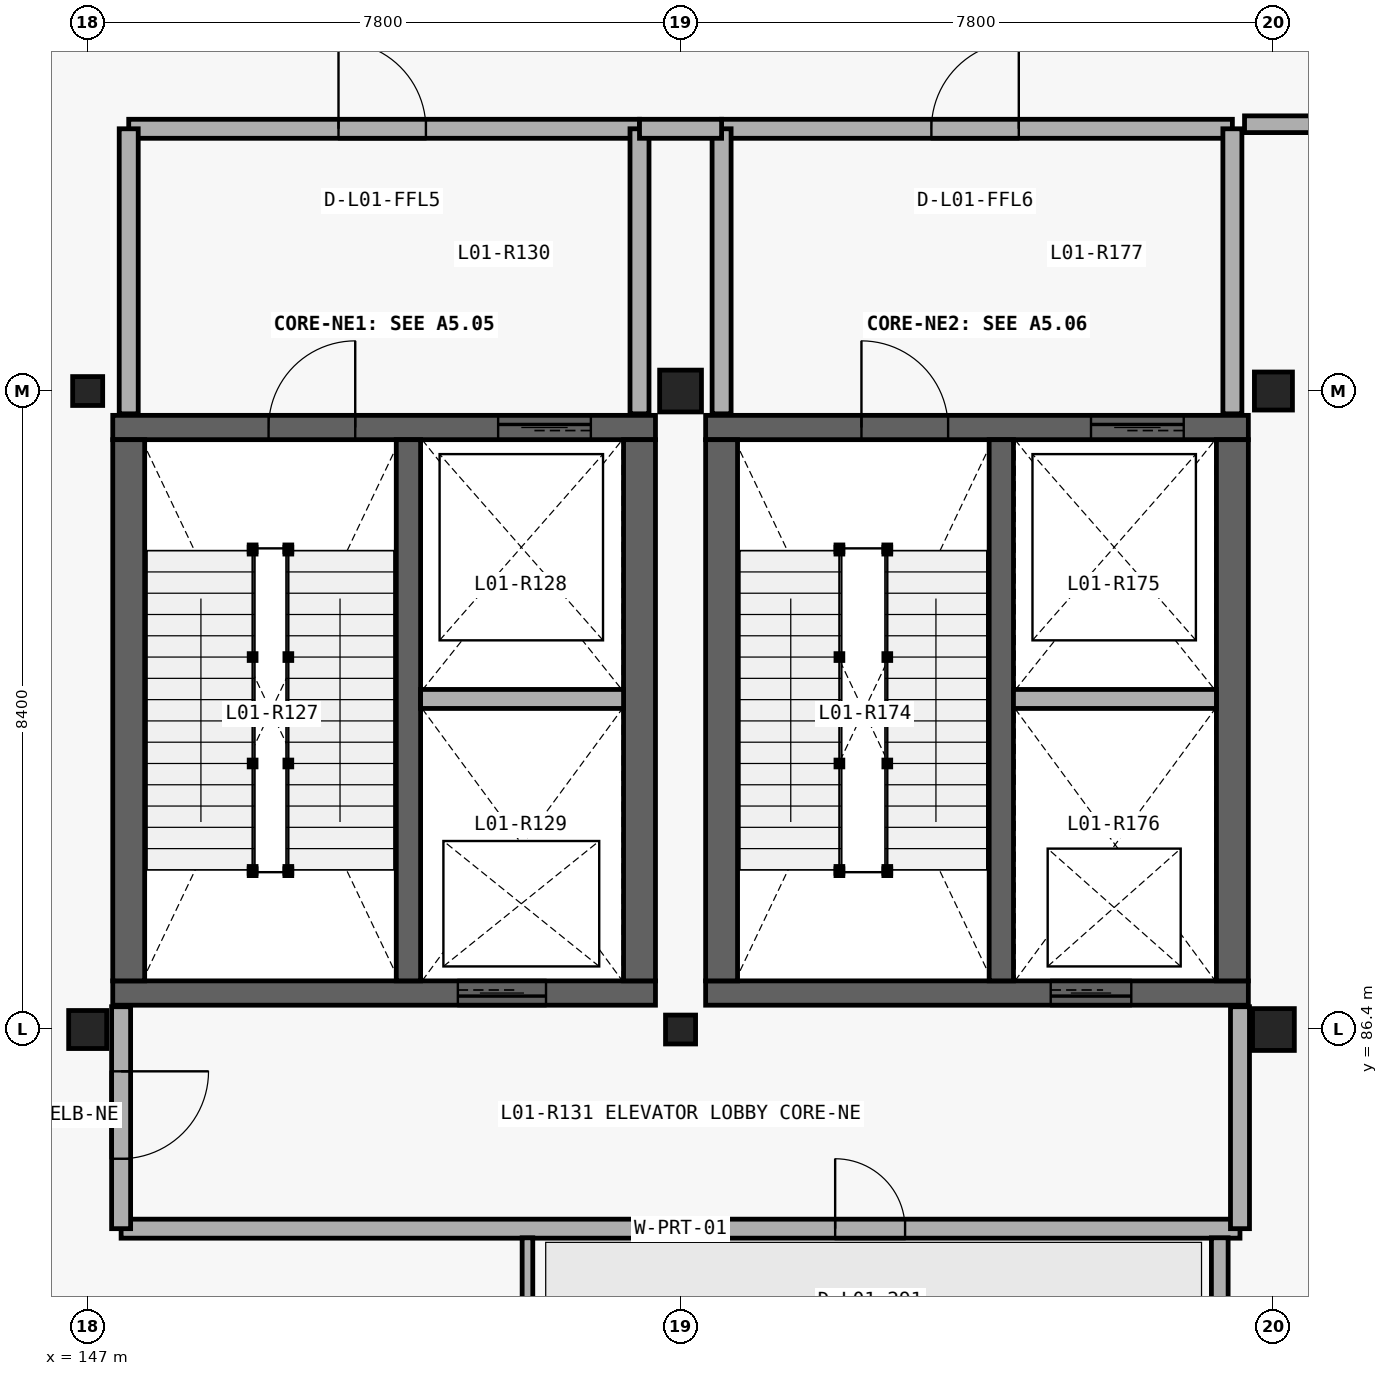
"""IFC4 building model, lengths in metres.
Left out: names, types, materials, properties, quantities, classifications, styles, units other than length and angle.
Written with IfcOpenShell. Run it as: python <this file> out.ifc"""

import sys

from ifc_helpers import new_model, si_unit, direction, frame, frame_2d, origin_with_axes, origin_2d_with_axis, place, context, subcontext, project, spatial, rectangle, i_section, extrude, element, fill, save


model = new_model("IFC4")
c1 = context("Model", 3, precision=1e-05, world=origin_with_axes(), true_north=direction((0.0, 1.0)))
c2 = subcontext(c1, "Body", "Model", "MODEL_VIEW")
j1 = project(units=[si_unit("LENGTHUNIT", "METRE"), si_unit("PLANEANGLEUNIT", "RADIAN")], contexts=[c1])
p1 = place(None, origin_with_axes())
s1 = spatial("IfcSite", under=j1, at=p1, CompositionType="ELEMENT")
p2 = place(p1, origin_with_axes())
s2 = spatial("IfcBuilding", under=s1, at=p2, CompositionType="ELEMENT")
p3 = place(p2, frame((0.0, 0.0, 5.4), z_axis=(0.0, 0.0, 1.0), x_axis=(1.0, 0.0, 0.0)))
s3 = spatial("IfcBuildingStorey", under=s2, at=p3, CompositionType="ELEMENT", Elevation=5.4)
p4 = place(None, frame((147.33, 86.88, 5.4), z_axis=(0.0, 0.0, 1.0), x_axis=(1.0, 0.0, 0.0)))
e1 = element("IfcWall", 1, at=p4, inside=s3, PredefinedType="SHEAR", context=c2, shape_type="SweptSolid", body=[
    extrude(rectangle(XDim=7.14, YDim=0.32, at=frame_2d((3.57, 0.0), x_axis=(1.0, 0.0))), origin_with_axes(), (0.0, 0.0, 1.0), 5.4),
])
p5 = place(None, frame((152.45, 86.88, 5.4), z_axis=(0.0, 0.0, 1.0), x_axis=(1.0, 0.0, 0.0)))
e2 = element("IfcOpeningElement", 2, at=p5, cuts=e1, PredefinedType="OPENING", context=c2, shape_type="SweptSolid", body=[
    extrude(rectangle(XDim=1.16, YDim=2.2, at=frame_2d((0.0, 1.1), x_axis=(1.0, 0.0))), frame((0.0, 0.17, 0.0), z_axis=(0.0, -1.0, 0.0), x_axis=(1.0, 0.0, 0.0)), (0.0, 0.0, 1.0), 0.34),
])
p6 = place(None, frame((154.47, 94.32, 5.4), z_axis=(0.0, 0.0, 1.0), x_axis=(-1.0, 0.0, 0.0)))
e3 = element("IfcWall", 3, at=p6, inside=s3, PredefinedType="SHEAR", context=c2, shape_type="SweptSolid", body=[
    extrude(rectangle(XDim=7.14, YDim=0.32, at=frame_2d((3.57, 0.0), x_axis=(1.0, 0.0))), origin_with_axes(), (0.0, 0.0, 1.0), 5.4),
])
p7 = place(None, frame((149.95, 94.32, 5.4), z_axis=(0.0, 0.0, 1.0), x_axis=(-1.0, 0.0, 0.0)))
e4 = element("IfcOpeningElement", 4, at=p7, cuts=e3, PredefinedType="OPENING", context=c2, shape_type="SweptSolid", body=[
    extrude(rectangle(XDim=1.14, YDim=2.18, at=frame_2d((0.0, 1.09), x_axis=(1.0, 0.0))), frame((0.0, 0.17, 0.0), z_axis=(0.0, -1.0, 0.0), x_axis=(1.0, 0.0, 0.0)), (0.0, 0.0, 1.0), 0.34),
])
p8 = place(None, frame((153.01, 94.32, 5.4), z_axis=(0.0, 0.0, 1.0), x_axis=(-1.0, 0.0, 0.0)))
e5 = element("IfcOpeningElement", 5, at=p8, cuts=e3, PredefinedType="OPENING", context=c2, shape_type="SweptSolid", body=[
    extrude(rectangle(XDim=1.22, YDim=2.28, at=frame_2d((0.0, 1.14), x_axis=(1.0, 0.0))), frame((0.0, 0.17, 0.0), z_axis=(0.0, -1.0, 0.0), x_axis=(1.0, 0.0, 0.0)), (0.0, 0.0, 1.0), 0.34),
])
for number, where, z_axis, x_axis in (
    (6, (154.26, 87.04, 5.4), (0.0, 0.0, 1.0), (0.0, 1.0, 0.0)),
    (7, (147.54, 94.16, 5.4), (0.0, 0.0, 1.0), (0.0, -1.0, 0.0)),
):
    element("IfcWall", number, at=place(None, frame(where, z_axis=z_axis, x_axis=x_axis)), inside=s3, PredefinedType="SHEAR", context=c2, shape_type="SweptSolid", body=[
        extrude(rectangle(XDim=7.12, YDim=0.42, at=frame_2d((3.56, 0.0), x_axis=(1.0, 0.0))), origin_with_axes(), (0.0, 0.0, 1.0), 5.4),
    ])
p9 = place(None, frame((151.22, 87.04, 5.4), z_axis=(0.0, 0.0, 1.0), x_axis=(0.0, 1.0, 0.0)))
e8 = element("IfcWall", 8, at=p9, inside=s3, PredefinedType="SHEAR", context=c2, shape_type="SweptSolid", body=[
    extrude(rectangle(XDim=7.12, YDim=0.32, at=frame_2d((3.56, 0.0), x_axis=(1.0, 0.0))), origin_with_axes(), (0.0, 0.0, 1.0), 5.4),
])
p10 = place(None, frame((151.38, 90.749, 5.4), z_axis=(0.0, 0.0, 1.0), x_axis=(1.0, 0.0, 0.0)))
e9 = element("IfcWall", 9, at=p10, inside=s3, PredefinedType="PARTITIONING", context=c2, shape_type="SweptSolid", body=[
    extrude(rectangle(XDim=2.67, YDim=0.25, at=frame_2d((1.335, 0.0), x_axis=(1.0, 0.0))), origin_with_axes(), (0.0, 0.0, 1.0), 5.08),
])
p11 = place(None, frame((154.26, 98.25, 5.4), z_axis=(0.0, 0.0, 1.0), x_axis=(-1.0, 0.0, 0.0)))
e10 = element("IfcWall", 10, at=p11, inside=s3, PredefinedType="PARTITIONING", context=c2, shape_type="SweptSolid", body=[
    extrude(rectangle(XDim=6.72, YDim=0.25, at=frame_2d((3.36, 0.0), x_axis=(1.0, 0.0))), origin_with_axes(), (0.0, 0.0, 1.0), 5.08),
])
p12 = place(None, frame((150.875, 98.25, 5.4), z_axis=(0.0, 0.0, 1.0), x_axis=(-1.0, 0.0, 0.0)))
e11 = element("IfcOpeningElement", 11, at=p12, cuts=e10, PredefinedType="OPENING", context=c2, shape_type="SweptSolid", body=[
    extrude(rectangle(XDim=1.15, YDim=2.25, at=frame_2d((0.0, 1.125), x_axis=(1.0, 0.0))), frame((0.0, 0.135, 0.0), z_axis=(0.0, -1.0, 0.0), x_axis=(1.0, 0.0, 0.0)), (0.0, 0.0, 1.0), 0.27),
])
for number, where, z_axis, x_axis in (
    (12, (147.54, 94.5, 5.4), (0.0, 0.0, 1.0), (0.0, 1.0, 0.0)),
    (13, (154.26, 94.5, 5.4), (0.0, 0.0, 1.0), (0.0, 1.0, 0.0)),
):
    element("IfcWall", number, at=place(None, frame(where, z_axis=z_axis, x_axis=x_axis)), inside=s3, PredefinedType="PARTITIONING", context=c2, shape_type="SweptSolid", body=[
        extrude(rectangle(XDim=3.75, YDim=0.25, at=frame_2d((1.875, 0.0), x_axis=(1.0, 0.0))), origin_with_axes(), (0.0, 0.0, 1.0), 5.08),
    ])
p13 = place(None, frame((147.44, 83.78, 5.4), z_axis=(0.0, 0.0, 1.0), x_axis=(1.0, 0.0, 0.0)))
e14 = element("IfcWall", 14, at=p13, inside=s3, PredefinedType="PARTITIONING", context=c2, shape_type="SweptSolid", body=[
    extrude(rectangle(XDim=14.72, YDim=0.25, at=frame_2d((7.36, 0.0), x_axis=(1.0, 0.0))), origin_with_axes(), (0.0, 0.0, 1.0), 4.61),
])
p14 = place(None, frame((157.294, 83.78, 5.4), z_axis=(0.0, 0.0, 1.0), x_axis=(1.0, 0.0, 0.0)))
e15 = element("IfcOpeningElement", 15, at=p14, cuts=e14, PredefinedType="OPENING", context=c2, shape_type="SweptSolid", body=[
    extrude(rectangle(XDim=0.92, YDim=2.14, at=frame_2d((0.0, 1.07), x_axis=(1.0, 0.0))), frame((0.0, 0.135, 0.0), z_axis=(0.0, -1.0, 0.0), x_axis=(1.0, 0.0, 0.0)), (0.0, 0.0, 1.0), 0.27),
])
p15 = place(None, frame((162.16, 83.78, 5.4), z_axis=(0.0, 0.0, 1.0), x_axis=(0.0, 1.0, 0.0)))
e16 = element("IfcWall", 16, at=p15, inside=s3, PredefinedType="PARTITIONING", context=c2, shape_type="SweptSolid", body=[
    extrude(rectangle(XDim=2.92, YDim=0.25, at=frame_2d((1.46, 0.0), x_axis=(1.0, 0.0))), origin_with_axes(), (0.0, 0.0, 1.0), 5.08),
])
p16 = place(None, frame((147.44, 86.7, 5.4), z_axis=(0.0, 0.0, 1.0), x_axis=(0.0, -1.0, 0.0)))
e17 = element("IfcWall", 17, at=p16, inside=s3, PredefinedType="PARTITIONING", context=c2, shape_type="SweptSolid", body=[
    extrude(rectangle(XDim=2.92, YDim=0.25, at=frame_2d((1.46, 0.0), x_axis=(1.0, 0.0))), origin_with_axes(), (0.0, 0.0, 1.0), 5.08),
])
p17 = place(None, frame((147.44, 85.275, 5.4), z_axis=(0.0, 0.0, 1.0), x_axis=(0.0, -1.0, 0.0)))
e18 = element("IfcOpeningElement", 18, at=p17, cuts=e17, PredefinedType="OPENING", context=c2, shape_type="SweptSolid", body=[
    extrude(rectangle(XDim=1.15, YDim=2.25, at=frame_2d((0.0, 1.125), x_axis=(1.0, 0.0))), frame((0.0, 0.135, 0.0), z_axis=(0.0, -1.0, 0.0), x_axis=(1.0, 0.0, 0.0)), (0.0, 0.0, 1.0), 0.27),
])
p18 = place(None, frame((155.13, 86.88, 5.4), z_axis=(0.0, 0.0, 1.0), x_axis=(1.0, 0.0, 0.0)))
e19 = element("IfcWall", 19, at=p18, inside=s3, PredefinedType="SHEAR", context=c2, shape_type="SweptSolid", body=[
    extrude(rectangle(XDim=7.14, YDim=0.32, at=frame_2d((3.57, 0.0), x_axis=(1.0, 0.0))), origin_with_axes(), (0.0, 0.0, 1.0), 5.4),
])
p19 = place(None, frame((160.2, 86.88, 5.4), z_axis=(0.0, 0.0, 1.0), x_axis=(1.0, 0.0, 0.0)))
e20 = element("IfcOpeningElement", 20, at=p19, cuts=e19, PredefinedType="OPENING", context=c2, shape_type="SweptSolid", body=[
    extrude(rectangle(XDim=1.06, YDim=2.16, at=frame_2d((0.0, 1.08), x_axis=(1.0, 0.0))), frame((0.0, 0.17, 0.0), z_axis=(0.0, -1.0, 0.0), x_axis=(1.0, 0.0, 0.0)), (0.0, 0.0, 1.0), 0.34),
])
p20 = place(None, frame((162.27, 94.32, 5.4), z_axis=(0.0, 0.0, 1.0), x_axis=(-1.0, 0.0, 0.0)))
e21 = element("IfcWall", 21, at=p20, inside=s3, PredefinedType="SHEAR", context=c2, shape_type="SweptSolid", body=[
    extrude(rectangle(XDim=7.14, YDim=0.32, at=frame_2d((3.57, 0.0), x_axis=(1.0, 0.0))), origin_with_axes(), (0.0, 0.0, 1.0), 5.4),
])
p21 = place(None, frame((157.75, 94.32, 5.4), z_axis=(0.0, 0.0, 1.0), x_axis=(-1.0, 0.0, 0.0)))
e22 = element("IfcOpeningElement", 22, at=p21, cuts=e21, PredefinedType="OPENING", context=c2, shape_type="SweptSolid", body=[
    extrude(rectangle(XDim=1.14, YDim=2.18, at=frame_2d((0.0, 1.09), x_axis=(1.0, 0.0))), frame((0.0, 0.17, 0.0), z_axis=(0.0, -1.0, 0.0), x_axis=(1.0, 0.0, 0.0)), (0.0, 0.0, 1.0), 0.34),
])
p22 = place(None, frame((160.81, 94.32, 5.4), z_axis=(0.0, 0.0, 1.0), x_axis=(-1.0, 0.0, 0.0)))
e23 = element("IfcOpeningElement", 23, at=p22, cuts=e21, PredefinedType="OPENING", context=c2, shape_type="SweptSolid", body=[
    extrude(rectangle(XDim=1.22, YDim=2.28, at=frame_2d((0.0, 1.14), x_axis=(1.0, 0.0))), frame((0.0, 0.17, 0.0), z_axis=(0.0, -1.0, 0.0), x_axis=(1.0, 0.0, 0.0)), (0.0, 0.0, 1.0), 0.34),
])
for number, where, z_axis, x_axis in (
    (24, (162.06, 87.04, 5.4), (0.0, 0.0, 1.0), (0.0, 1.0, 0.0)),
    (25, (155.34, 94.16, 5.4), (0.0, 0.0, 1.0), (0.0, -1.0, 0.0)),
):
    element("IfcWall", number, at=place(None, frame(where, z_axis=z_axis, x_axis=x_axis)), inside=s3, PredefinedType="SHEAR", context=c2, shape_type="SweptSolid", body=[
        extrude(rectangle(XDim=7.12, YDim=0.42, at=frame_2d((3.56, 0.0), x_axis=(1.0, 0.0))), origin_with_axes(), (0.0, 0.0, 1.0), 5.4),
    ])
p23 = place(None, frame((159.02, 87.04, 5.4), z_axis=(0.0, 0.0, 1.0), x_axis=(0.0, 1.0, 0.0)))
e26 = element("IfcWall", 26, at=p23, inside=s3, PredefinedType="SHEAR", context=c2, shape_type="SweptSolid", body=[
    extrude(rectangle(XDim=7.12, YDim=0.32, at=frame_2d((3.56, 0.0), x_axis=(1.0, 0.0))), origin_with_axes(), (0.0, 0.0, 1.0), 5.4),
])
p24 = place(None, frame((159.18, 90.749, 5.4), z_axis=(0.0, 0.0, 1.0), x_axis=(1.0, 0.0, 0.0)))
e27 = element("IfcWall", 27, at=p24, inside=s3, PredefinedType="PARTITIONING", context=c2, shape_type="SweptSolid", body=[
    extrude(rectangle(XDim=2.67, YDim=0.25, at=frame_2d((1.335, 0.0), x_axis=(1.0, 0.0))), origin_with_axes(), (0.0, 0.0, 1.0), 5.08),
])
p25 = place(None, frame((162.06, 98.25, 5.4), z_axis=(0.0, 0.0, 1.0), x_axis=(-1.0, 0.0, 0.0)))
e28 = element("IfcWall", 28, at=p25, inside=s3, PredefinedType="PARTITIONING", context=c2, shape_type="SweptSolid", body=[
    extrude(rectangle(XDim=6.72, YDim=0.25, at=frame_2d((3.36, 0.0), x_axis=(1.0, 0.0))), origin_with_axes(), (0.0, 0.0, 1.0), 5.08),
])
p26 = place(None, frame((158.675, 98.25, 5.4), z_axis=(0.0, 0.0, 1.0), x_axis=(-1.0, 0.0, 0.0)))
e29 = element("IfcOpeningElement", 29, at=p26, cuts=e28, PredefinedType="OPENING", context=c2, shape_type="SweptSolid", body=[
    extrude(rectangle(XDim=1.15, YDim=2.25, at=frame_2d((0.0, 1.125), x_axis=(1.0, 0.0))), frame((0.0, 0.135, 0.0), z_axis=(0.0, -1.0, 0.0), x_axis=(1.0, 0.0, 0.0)), (0.0, 0.0, 1.0), 0.27),
])
for number, where, z_axis, x_axis in (
    (30, (155.34, 94.5, 5.4), (0.0, 0.0, 1.0), (0.0, 1.0, 0.0)),
    (31, (162.06, 94.5, 5.4), (0.0, 0.0, 1.0), (0.0, 1.0, 0.0)),
):
    element("IfcWall", number, at=place(None, frame(where, z_axis=z_axis, x_axis=x_axis)), inside=s3, PredefinedType="PARTITIONING", context=c2, shape_type="SweptSolid", body=[
        extrude(rectangle(XDim=3.75, YDim=0.25, at=frame_2d((1.875, 0.0), x_axis=(1.0, 0.0))), origin_with_axes(), (0.0, 0.0, 1.0), 5.08),
    ])
p27 = place(None, frame((154.26, 98.25, 5.4), z_axis=(0.0, 0.0, 1.0), x_axis=(1.0, 0.0, 0.0)))
e32 = element("IfcWall", 32, at=p27, inside=s3, PredefinedType="PARTITIONING", context=c2, shape_type="SweptSolid", body=[
    extrude(rectangle(XDim=1.08, YDim=0.25, at=frame_2d((0.54, 0.0), x_axis=(1.0, 0.0))), origin_with_axes(), (0.0, 0.0, 1.0), 5.08),
])
p28 = place(None, frame((162.22, 98.31, 5.4), z_axis=(0.0, 0.0, 1.0), x_axis=(1.0, 0.0, 0.0)))
e33 = element("IfcWall", 33, at=p28, inside=s3, PredefinedType="PARTITIONING", context=c2, shape_type="SweptSolid", body=[
    extrude(rectangle(XDim=7.04, YDim=0.22, at=frame_2d((3.52, 0.0), x_axis=(1.0, 0.0))), origin_with_axes(), (0.0, 0.0, 1.0), 5.08),
])
p29 = place(None, frame((165.74, 98.31, 5.4), z_axis=(0.0, 0.0, 1.0), x_axis=(1.0, 0.0, 0.0)))
e34 = element("IfcOpeningElement", 34, at=p29, cuts=e33, PredefinedType="OPENING", context=c2, shape_type="SweptSolid", body=[
    extrude(rectangle(XDim=0.95, YDim=2.16, at=frame_2d((0.0, 1.08), x_axis=(1.0, 0.0))), frame((0.0, 0.12, 0.0), z_axis=(0.0, -1.0, 0.0), x_axis=(1.0, 0.0, 0.0)), (0.0, 0.0, 1.0), 0.24),
])
p30 = place(None, frame((152.786, 69.74, 5.4), z_axis=(0.0, 0.0, 1.0), x_axis=(0.0, 1.0, 0.0)))
e35 = element("IfcWall", 35, at=p30, inside=s3, PredefinedType="PARTITIONING", context=c2, shape_type="SweptSolid", body=[
    extrude(rectangle(XDim=13.92, YDim=0.14, at=frame_2d((6.96, 0.0), x_axis=(1.0, 0.0))), origin_with_axes(), (0.0, 0.0, 1.0), 5.08),
])
p31 = place(None, frame((161.894, 69.74, 5.4), z_axis=(0.0, 0.0, 1.0), x_axis=(0.0, 1.0, 0.0)))
e36 = element("IfcWall", 36, at=p31, inside=s3, PredefinedType="PARTITIONING", context=c2, shape_type="SweptSolid", body=[
    extrude(rectangle(XDim=13.92, YDim=0.22, at=frame_2d((6.96, 0.0), x_axis=(1.0, 0.0))), origin_with_axes(), (0.0, 0.0, 1.0), 5.08),
])
p32 = place(None, frame((147.0, 86.4, 5.4), z_axis=(0.0, 0.0, 1.0), x_axis=(1.0, 0.0, 0.0)))
e37 = element("IfcColumn", 37, at=p32, inside=s3, PredefinedType="COLUMN", context=c2, shape_type="SweptSolid", body=[
    extrude(i_section(OverallWidth=0.5, OverallDepth=0.5, WebThickness=0.022, FlangeThickness=0.036, at=origin_2d_with_axis()), origin_with_axes(), (0.0, 0.0, 1.0), 5.4),
])
for number, where, z_axis, x_axis in (
    (38, (147.0, 94.8, 5.4), (0.0, 0.0, 1.0), (1.0, 0.0, 0.0)),
    (39, (154.8, 86.4, 5.4), (0.0, 0.0, 1.0), (1.0, 0.0, 0.0)),
):
    element("IfcColumn", number, at=place(None, frame(where, z_axis=z_axis, x_axis=x_axis)), inside=s3, PredefinedType="COLUMN", context=c2, shape_type="SweptSolid", body=[
        extrude(i_section(OverallWidth=0.395, OverallDepth=0.38, WebThickness=0.019, FlangeThickness=0.03, at=origin_2d_with_axis()), origin_with_axes(), (0.0, 0.0, 1.0), 5.4),
    ])
for number, where, z_axis, x_axis in (
    (40, (154.8, 94.8, 5.4), (0.0, 0.0, 1.0), (1.0, 0.0, 0.0)),
    (41, (162.6, 86.4, 5.4), (0.0, 0.0, 1.0), (1.0, 0.0, 0.0)),
):
    element("IfcColumn", number, at=place(None, frame(where, z_axis=z_axis, x_axis=x_axis)), inside=s3, PredefinedType="COLUMN", context=c2, shape_type="SweptSolid", body=[
        extrude(i_section(OverallWidth=0.55, OverallDepth=0.55, WebThickness=0.025, FlangeThickness=0.042, at=origin_2d_with_axis()), origin_with_axes(), (0.0, 0.0, 1.0), 5.4),
    ])
p33 = place(None, frame((162.6, 94.8, 5.4), z_axis=(0.0, 0.0, 1.0), x_axis=(1.0, 0.0, 0.0)))
e42 = element("IfcColumn", 42, at=p33, inside=s3, PredefinedType="COLUMN", context=c2, shape_type="SweptSolid", body=[
    extrude(i_section(OverallWidth=0.5, OverallDepth=0.5, WebThickness=0.022, FlangeThickness=0.036, at=origin_2d_with_axis()), origin_with_axes(), (0.0, 0.0, 1.0), 5.4),
])
p34 = place(None, frame((149.95, 94.32, 5.4), z_axis=(0.0, 0.0, 1.0), x_axis=(1.0, 0.0, 0.0)))
e43 = element("IfcDoor", 43, at=p34, inside=s3, OperationType="SINGLE_SWING_LEFT", PredefinedType="DOOR", context=c2, shape_type="SweptSolid", body=[
    extrude(rectangle(XDim=1.14, YDim=2.18, at=frame_2d((0.0, 1.09), x_axis=(1.0, 0.0))), frame((0.0, 0.04, 0.0), z_axis=(0.0, -1.0, 0.0), x_axis=(1.0, 0.0, 0.0)), (0.0, 0.0, 1.0), 0.08),
])
fill(e4, e43)
p35 = place(None, frame((153.01, 94.32, 5.4), z_axis=(0.0, 0.0, 1.0), x_axis=(1.0, 0.0, 0.0)))
e44 = element("IfcDoor", 44, at=p35, inside=s3, OperationType="SLIDING_TO_LEFT", PredefinedType="DOOR", context=c2, shape_type="SweptSolid", body=[
    extrude(rectangle(XDim=1.22, YDim=2.28, at=frame_2d((0.0, 1.14), x_axis=(1.0, 0.0))), frame((0.0, 0.04, 0.0), z_axis=(0.0, -1.0, 0.0), x_axis=(1.0, 0.0, 0.0)), (0.0, 0.0, 1.0), 0.08),
])
fill(e5, e44)
p36 = place(None, frame((152.45, 86.88, 5.4), z_axis=(0.0, 0.0, 1.0), x_axis=(-1.0, 0.0, 0.0)))
e45 = element("IfcDoor", 45, at=p36, inside=s3, OperationType="SLIDING_TO_LEFT", PredefinedType="DOOR", context=c2, shape_type="SweptSolid", body=[
    extrude(rectangle(XDim=1.16, YDim=2.2, at=frame_2d((0.0, 1.1), x_axis=(1.0, 0.0))), frame((0.0, 0.04, 0.0), z_axis=(0.0, -1.0, 0.0), x_axis=(1.0, 0.0, 0.0)), (0.0, 0.0, 1.0), 0.08),
])
fill(e2, e45)
p37 = place(None, frame((150.875, 98.25, 5.4), z_axis=(0.0, 0.0, 1.0), x_axis=(1.0, 0.0, 0.0)))
e46 = element("IfcDoor", 46, at=p37, inside=s3, OperationType="SINGLE_SWING_RIGHT", PredefinedType="DOOR", context=c2, shape_type="SweptSolid", body=[
    extrude(rectangle(XDim=1.15, YDim=2.25, at=frame_2d((0.0, 1.125), x_axis=(1.0, 0.0))), frame((0.0, 0.04, 0.0), z_axis=(0.0, -1.0, 0.0), x_axis=(1.0, 0.0, 0.0)), (0.0, 0.0, 1.0), 0.08),
])
fill(e11, e46)
p38 = place(None, frame((147.44, 85.275, 5.4), z_axis=(0.0, 0.0, 1.0), x_axis=(0.0, -1.0, 0.0)))
e47 = element("IfcDoor", 47, at=p38, inside=s3, OperationType="SINGLE_SWING_LEFT", PredefinedType="DOOR", context=c2, shape_type="SweptSolid", body=[
    extrude(rectangle(XDim=1.15, YDim=2.25, at=frame_2d((0.0, 1.125), x_axis=(1.0, 0.0))), frame((0.0, 0.04, 0.0), z_axis=(0.0, -1.0, 0.0), x_axis=(1.0, 0.0, 0.0)), (0.0, 0.0, 1.0), 0.08),
])
fill(e18, e47)
p39 = place(None, frame((157.75, 94.32, 5.4), z_axis=(0.0, 0.0, 1.0), x_axis=(1.0, 0.0, 0.0)))
e48 = element("IfcDoor", 48, at=p39, inside=s3, OperationType="SINGLE_SWING_RIGHT", PredefinedType="DOOR", context=c2, shape_type="SweptSolid", body=[
    extrude(rectangle(XDim=1.14, YDim=2.18, at=frame_2d((0.0, 1.09), x_axis=(1.0, 0.0))), frame((0.0, 0.04, 0.0), z_axis=(0.0, -1.0, 0.0), x_axis=(1.0, 0.0, 0.0)), (0.0, 0.0, 1.0), 0.08),
])
fill(e22, e48)
p40 = place(None, frame((160.81, 94.32, 5.4), z_axis=(0.0, 0.0, 1.0), x_axis=(1.0, 0.0, 0.0)))
e49 = element("IfcDoor", 49, at=p40, inside=s3, OperationType="SLIDING_TO_LEFT", PredefinedType="DOOR", context=c2, shape_type="SweptSolid", body=[
    extrude(rectangle(XDim=1.22, YDim=2.28, at=frame_2d((0.0, 1.14), x_axis=(1.0, 0.0))), frame((0.0, 0.04, 0.0), z_axis=(0.0, -1.0, 0.0), x_axis=(1.0, 0.0, 0.0)), (0.0, 0.0, 1.0), 0.08),
])
fill(e23, e49)
p41 = place(None, frame((160.2, 86.88, 5.4), z_axis=(0.0, 0.0, 1.0), x_axis=(-1.0, 0.0, 0.0)))
e50 = element("IfcDoor", 50, at=p41, inside=s3, OperationType="SLIDING_TO_LEFT", PredefinedType="DOOR", context=c2, shape_type="SweptSolid", body=[
    extrude(rectangle(XDim=1.06, YDim=2.16, at=frame_2d((0.0, 1.08), x_axis=(1.0, 0.0))), frame((0.0, 0.04, 0.0), z_axis=(0.0, -1.0, 0.0), x_axis=(1.0, 0.0, 0.0)), (0.0, 0.0, 1.0), 0.08),
])
fill(e20, e50)
p42 = place(None, frame((158.675, 98.25, 5.4), z_axis=(0.0, 0.0, 1.0), x_axis=(1.0, 0.0, 0.0)))
e51 = element("IfcDoor", 51, at=p42, inside=s3, OperationType="SINGLE_SWING_LEFT", PredefinedType="DOOR", context=c2, shape_type="SweptSolid", body=[
    extrude(rectangle(XDim=1.15, YDim=2.25, at=frame_2d((0.0, 1.125), x_axis=(1.0, 0.0))), frame((0.0, 0.04, 0.0), z_axis=(0.0, -1.0, 0.0), x_axis=(1.0, 0.0, 0.0)), (0.0, 0.0, 1.0), 0.08),
])
fill(e29, e51)
p43 = place(None, frame((157.294, 83.78, 5.4), z_axis=(0.0, 0.0, 1.0), x_axis=(1.0, 0.0, 0.0)))
e52 = element("IfcDoor", 52, at=p43, inside=s3, OperationType="SINGLE_SWING_LEFT", PredefinedType="DOOR", context=c2, shape_type="SweptSolid", body=[
    extrude(rectangle(XDim=0.92, YDim=2.14, at=frame_2d((0.0, 1.07), x_axis=(1.0, 0.0))), frame((0.0, 0.04, 0.0), z_axis=(0.0, -1.0, 0.0), x_axis=(1.0, 0.0, 0.0)), (0.0, 0.0, 1.0), 0.08),
])
fill(e15, e52)
save(model, sys.argv[1])
